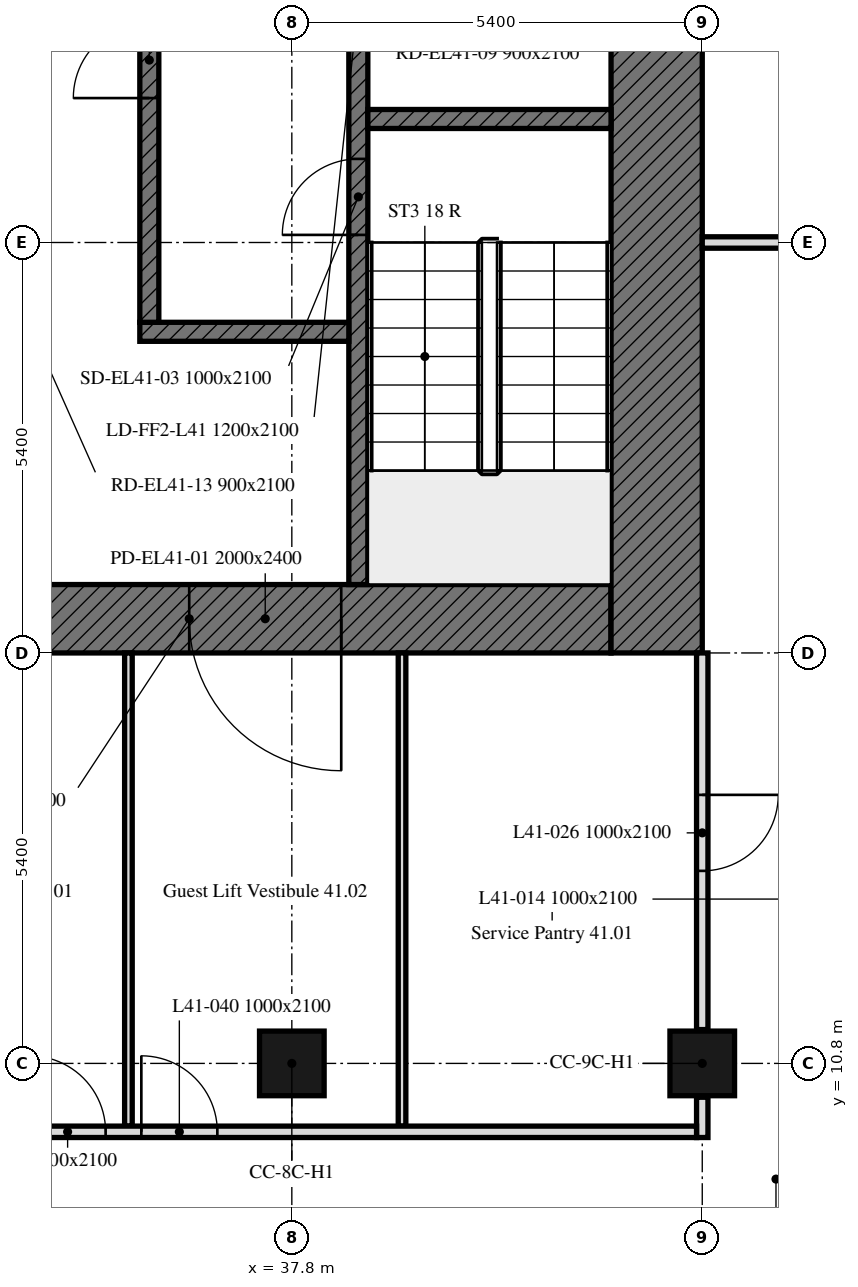
"""IFC4 building model, lengths in metres.
Left out: names, types, materials, properties, quantities, classifications, styles, units other than length and angle.
Written with IfcOpenShell. Run it as: python <this file> out.ifc"""

import sys

from ifc_helpers import new_model, si_unit, direction, frame, frame_2d, origin, origin_2d, place, context, subcontext, project, spatial, rectangle, extrude, element, fill, save


model = new_model("IFC4")
c1 = context("Model", 3, precision=1e-05, world=origin(), true_north=direction((0.0, 1.0)))
c2 = subcontext(c1, "Body", "Model", "MODEL_VIEW")
j1 = project(units=[si_unit("LENGTHUNIT", "METRE"), si_unit("PLANEANGLEUNIT", "RADIAN")], contexts=[c1])
p1 = place(None, origin())
s1 = spatial("IfcSite", under=j1, at=p1, CompositionType="ELEMENT")
p2 = place(p1, origin())
s2 = spatial("IfcBuilding", under=s1, at=p2, CompositionType="ELEMENT")
p3 = place(p2, frame((0.0, 0.0, 172.6)))
s3 = spatial("IfcBuildingStorey", under=s2, at=p3, CompositionType="ELEMENT", Elevation=172.6)
for number, where, z_axis, x_axis in (
    (1, (37.8, 10.8, 0.0), (0.0, 0.0, 1.0), (1.0, 0.0, 0.0)),
    (2, (43.2, 10.8, 0.0), (0.0, 0.0, 1.0), (1.0, 0.0, 0.0)),
):
    element("IfcColumn", number, at=place(p3, frame(where, z_axis=z_axis, x_axis=x_axis)), inside=s3, PredefinedType="COLUMN", context=c2, shape_type="SweptSolid", body=[
        extrude(rectangle(XDim=0.85, YDim=0.85, at=origin_2d()), origin(), (0.0, 0.0, 1.0), 2.8),
    ])
p4 = place(p3, frame((42.0, 16.65, 0.0), z_axis=(0.0, 0.0, 1.0), x_axis=(-1.0, 0.0, 0.0)))
e3 = element("IfcWall", 3, at=p4, inside=s3, PredefinedType="SOLIDWALL", context=c2, shape_type="SweptSolid", body=[
    extrude(rectangle(XDim=11.1, YDim=0.9, at=frame_2d((5.55, 0.0))), origin(), (0.0, 0.0, 1.0), 2.8),
])
p5 = place(p4, frame((3.55, 0.0, 0.0)))
e4 = element("IfcOpeningElement", 4, at=p5, cuts=e3, PredefinedType="OPENING", context=c2, shape_type="SweptSolid", body=[
    extrude(rectangle(XDim=2.0, YDim=2.4, at=frame_2d((1.0, 1.2))), frame((0.0, 0.45, 0.0), z_axis=(0.0, -1.0, 0.0), x_axis=(1.0, 0.0, 0.0)), (0.0, 0.0, 1.0), 0.9),
])
p6 = place(p3, frame((42.6, 32.4, 0.0), z_axis=(0.0, 0.0, 1.0), x_axis=(0.0, -1.0, 0.0)))
e5 = element("IfcWall", 5, at=p6, inside=s3, PredefinedType="SOLIDWALL", context=c2, shape_type="SweptSolid", body=[
    extrude(rectangle(XDim=16.2, YDim=1.2, at=frame_2d((8.1, 0.0))), origin(), (0.0, 0.0, 1.0), 2.8),
])
p7 = place(p3, frame((38.675, 17.1, 0.0), z_axis=(0.0, 0.0, 1.0), x_axis=(0.0, 1.0, 0.0)))
e6 = element("IfcWall", 6, at=p7, inside=s3, PredefinedType="SOLIDWALL", context=c2, shape_type="SweptSolid", body=[
    extrude(rectangle(XDim=14.4, YDim=0.25, at=frame_2d((7.2, 0.0))), origin(), (0.0, 0.0, 1.0), 2.8),
])
p8 = place(p7, frame((4.6, 0.0, 0.0)))
e7 = element("IfcOpeningElement", 7, at=p8, cuts=e6, PredefinedType="OPENING", context=c2, shape_type="SweptSolid", body=[
    extrude(rectangle(XDim=1.0, YDim=2.1, at=frame_2d((0.5, 1.05))), frame((0.0, 0.125, 0.0), z_axis=(0.0, -1.0, 0.0), x_axis=(1.0, 0.0, 0.0)), (0.0, 0.0, 1.0), 0.25),
])
p9 = place(p7, frame((7.062, 0.0, 0.0)))
e8 = element("IfcOpeningElement", 8, at=p9, cuts=e6, PredefinedType="OPENING", context=c2, shape_type="SweptSolid", body=[
    extrude(rectangle(XDim=1.2, YDim=2.1, at=frame_2d((0.6, 1.05))), frame((0.0, 0.125, 0.0), z_axis=(0.0, -1.0, 0.0), x_axis=(1.0, 0.0, 0.0)), (0.0, 0.0, 1.0), 0.25),
])
p10 = place(p7, frame((9.472, 0.0, 0.0)))
e9 = element("IfcOpeningElement", 9, at=p10, cuts=e6, PredefinedType="OPENING", context=c2, shape_type="SweptSolid", body=[
    extrude(rectangle(XDim=0.9, YDim=2.1, at=frame_2d((0.45, 1.05))), frame((0.0, 0.125, 0.0), z_axis=(0.0, -1.0, 0.0), x_axis=(1.0, 0.0, 0.0)), (0.0, 0.0, 1.0), 0.25),
])
p11 = place(p7, frame((10.779, 0.0, 0.0)))
e10 = element("IfcOpeningElement", 10, at=p11, cuts=e6, PredefinedType="OPENING", context=c2, shape_type="SweptSolid", body=[
    extrude(rectangle(XDim=0.9, YDim=2.1, at=frame_2d((0.45, 1.05))), frame((0.0, 0.125, 0.0), z_axis=(0.0, -1.0, 0.0), x_axis=(1.0, 0.0, 0.0)), (0.0, 0.0, 1.0), 0.25),
])
p12 = place(p7, frame((12.048, 0.0, 0.0)))
e11 = element("IfcOpeningElement", 11, at=p12, cuts=e6, PredefinedType="OPENING", context=c2, shape_type="SweptSolid", body=[
    extrude(rectangle(XDim=0.9, YDim=2.1, at=frame_2d((0.45, 1.05))), frame((0.0, 0.125, 0.0), z_axis=(0.0, -1.0, 0.0), x_axis=(1.0, 0.0, 0.0)), (0.0, 0.0, 1.0), 0.25),
])
p13 = place(p7, frame((13.354, 0.0, 0.0)))
e12 = element("IfcOpeningElement", 12, at=p13, cuts=e6, PredefinedType="OPENING", context=c2, shape_type="SweptSolid", body=[
    extrude(rectangle(XDim=0.9, YDim=2.1, at=frame_2d((0.45, 1.05))), frame((0.0, 0.125, 0.0), z_axis=(0.0, -1.0, 0.0), x_axis=(1.0, 0.0, 0.0)), (0.0, 0.0, 1.0), 0.25),
])
p14 = place(p3, frame((38.8, 23.225, 0.0), z_axis=(0.0, 0.0, 1.0), x_axis=(1.0, 0.0, 0.0)))
e13 = element("IfcWall", 13, at=p14, inside=s3, PredefinedType="SOLIDWALL", context=c2, shape_type="SweptSolid", body=[
    extrude(rectangle(XDim=3.2, YDim=0.25, at=frame_2d((1.6, 0.0))), origin(), (0.0, 0.0, 1.0), 2.8),
])
p15 = place(p3, frame((35.8, 20.425, 0.0), z_axis=(0.0, 0.0, 1.0), x_axis=(1.0, 0.0, 0.0)))
e14 = element("IfcWall", 14, at=p15, inside=s3, PredefinedType="SOLIDWALL", context=c2, shape_type="SweptSolid", body=[
    extrude(rectangle(XDim=2.75, YDim=0.25, at=frame_2d((1.375, 0.0))), origin(), (0.0, 0.0, 1.0), 2.8),
])
p16 = place(p3, frame((35.925, 20.55, 0.0), z_axis=(0.0, 0.0, 1.0), x_axis=(0.0, 1.0, 0.0)))
e15 = element("IfcWall", 15, at=p16, inside=s3, PredefinedType="SOLIDWALL", context=c2, shape_type="SweptSolid", body=[
    extrude(rectangle(XDim=5.625, YDim=0.25, at=frame_2d((2.812, 0.0))), origin(), (0.0, 0.0, 1.0), 2.8),
])
p17 = place(p16, frame((2.95, 0.0, 0.0)))
e16 = element("IfcOpeningElement", 16, at=p17, cuts=e15, PredefinedType="OPENING", context=c2, shape_type="SweptSolid", body=[
    extrude(rectangle(XDim=1.0, YDim=2.1, at=frame_2d((0.5, 1.05))), frame((0.0, 0.125, 0.0), z_axis=(0.0, -1.0, 0.0), x_axis=(1.0, 0.0, 0.0)), (0.0, 0.0, 1.0), 0.25),
])
p18 = place(p3, frame((43.2, 21.6, 0.0), z_axis=(0.0, 0.0, 1.0), x_axis=(1.0, 0.0, 0.0)))
e17 = element("IfcWall", 17, at=p18, inside=s3, PredefinedType="PARTITIONING", context=c2, shape_type="SweptSolid", body=[
    extrude(rectangle(XDim=4.649, YDim=0.15, at=frame_2d((2.325, 0.0))), origin(), (0.0, 0.0, 1.0), 2.2),
])
for number, where, z_axis, x_axis in (
    (18, (35.65, 16.2, 0.0), (0.0, 0.0, 1.0), (0.0, -1.0, 0.0)),
    (19, (39.25, 9.975, 0.0), (0.0, 0.0, 1.0), (0.0, 1.0, 0.0)),
):
    element("IfcWall", number, at=place(p3, frame(where, z_axis=z_axis, x_axis=x_axis)), inside=s3, PredefinedType="PARTITIONING", context=c2, shape_type="SweptSolid", body=[
        extrude(rectangle(XDim=6.225, YDim=0.1, at=frame_2d((3.112, 0.0))), origin(), (0.0, 0.0, 1.0), 2.2),
    ])
p19 = place(p3, frame((43.2, 16.2, 0.0), z_axis=(0.0, 0.0, 1.0), x_axis=(0.0, -1.0, 0.0)))
e20 = element("IfcWall", 20, at=p19, inside=s3, PredefinedType="PARTITIONING", context=c2, shape_type="SweptSolid", body=[
    extrude(rectangle(XDim=4.955, YDim=0.15, at=frame_2d((2.478, 0.0))), origin(), (0.0, 0.0, 1.0), 2.8),
])
p20 = place(p19, frame((1.867, 0.0, 0.0)))
e21 = element("IfcOpeningElement", 21, at=p20, cuts=e20, PredefinedType="OPENING", context=c2, shape_type="SweptSolid", body=[
    extrude(rectangle(XDim=1.0, YDim=2.1, at=frame_2d((0.5, 1.05))), frame((0.0, 0.075, 0.0), z_axis=(0.0, -1.0, 0.0), x_axis=(1.0, 0.0, 0.0)), (0.0, 0.0, 1.0), 0.15),
])
p21 = place(p3, frame((43.2, 10.355, 0.0), z_axis=(0.0, 0.0, 1.0), x_axis=(0.0, -1.0, 0.0)))
e22 = element("IfcWall", 22, at=p21, inside=s3, PredefinedType="PARTITIONING", context=c2, shape_type="SweptSolid", body=[
    extrude(rectangle(XDim=0.53, YDim=0.15, at=frame_2d((0.265, 0.0))), origin(), (0.0, 0.0, 1.0), 2.8),
])
p22 = place(p3, frame((6.151, 9.9, 0.0), z_axis=(0.0, 0.0, 1.0), x_axis=(1.0, 0.0, 0.0)))
e23 = element("IfcWall", 23, at=p22, inside=s3, PredefinedType="PARTITIONING", context=c2, shape_type="SweptSolid", body=[
    extrude(rectangle(XDim=36.974, YDim=0.15, at=frame_2d((18.487, 0.0))), origin(), (0.0, 0.0, 1.0), 2.2),
])
p23 = place(p22, frame((17.649, 0.0, 0.0)))
e24 = element("IfcOpeningElement", 24, at=p23, cuts=e23, PredefinedType="OPENING", context=c2, shape_type="SweptSolid", body=[
    extrude(rectangle(XDim=1.0, YDim=2.1, at=frame_2d((0.5, 1.05))), frame((0.0, 0.075, 0.0), z_axis=(0.0, -1.0, 0.0), x_axis=(1.0, 0.0, 0.0)), (0.0, 0.0, 1.0), 0.15),
])
p24 = place(p22, frame((1.409, 0.0, 0.0)))
e25 = element("IfcOpeningElement", 25, at=p24, cuts=e23, PredefinedType="OPENING", context=c2, shape_type="SweptSolid", body=[
    extrude(rectangle(XDim=1.0, YDim=2.1, at=frame_2d((0.5, 1.05))), frame((0.0, 0.075, 0.0), z_axis=(0.0, -1.0, 0.0), x_axis=(1.0, 0.0, 0.0)), (0.0, 0.0, 1.0), 0.15),
])
p25 = place(p22, frame((28.199, 0.0, 0.0)))
e26 = element("IfcOpeningElement", 26, at=p25, cuts=e23, PredefinedType="OPENING", context=c2, shape_type="SweptSolid", body=[
    extrude(rectangle(XDim=1.0, YDim=2.1, at=frame_2d((0.5, 1.05))), frame((0.0, 0.075, 0.0), z_axis=(0.0, -1.0, 0.0), x_axis=(1.0, 0.0, 0.0)), (0.0, 0.0, 1.0), 0.15),
])
p26 = place(p22, frame((7.099, 0.0, 0.0)))
e27 = element("IfcOpeningElement", 27, at=p26, cuts=e23, PredefinedType="OPENING", context=c2, shape_type="SweptSolid", body=[
    extrude(rectangle(XDim=1.0, YDim=2.1, at=frame_2d((0.5, 1.05))), frame((0.0, 0.075, 0.0), z_axis=(0.0, -1.0, 0.0), x_axis=(1.0, 0.0, 0.0)), (0.0, 0.0, 1.0), 0.15),
])
p27 = place(p22, frame((5.629, 0.0, 0.0)))
e28 = element("IfcOpeningElement", 28, at=p27, cuts=e23, PredefinedType="OPENING", context=c2, shape_type="SweptSolid", body=[
    extrude(rectangle(XDim=1.0, YDim=2.1, at=frame_2d((0.5, 1.05))), frame((0.0, 0.075, 0.0), z_axis=(0.0, -1.0, 0.0), x_axis=(1.0, 0.0, 0.0)), (0.0, 0.0, 1.0), 0.15),
])
p28 = place(p22, frame((29.669, 0.0, 0.0)))
e29 = element("IfcOpeningElement", 29, at=p28, cuts=e23, PredefinedType="OPENING", context=c2, shape_type="SweptSolid", body=[
    extrude(rectangle(XDim=1.0, YDim=2.1, at=frame_2d((0.5, 1.05))), frame((0.0, 0.075, 0.0), z_axis=(0.0, -1.0, 0.0), x_axis=(1.0, 0.0, 0.0)), (0.0, 0.0, 1.0), 0.15),
])
p29 = place(p5, origin())
e30 = element("IfcDoor", 30, at=p29, inside=s3, OperationType="DOUBLE_DOOR_SINGLE_SWING", PredefinedType="DOOR", context=c2, shape_type="SweptSolid", body=[
    extrude(rectangle(XDim=2.0, YDim=2.4, at=frame_2d((1.0, 1.2))), frame((0.0, 0.025, 0.0), z_axis=(0.0, -1.0, 0.0), x_axis=(1.0, 0.0, 0.0)), (0.0, 0.0, 1.0), 0.05),
])
fill(e4, e30)
p30 = place(p8, origin())
e31 = element("IfcDoor", 31, at=p30, inside=s3, OperationType="SINGLE_SWING_LEFT", PredefinedType="DOOR", context=c2, shape_type="SweptSolid", body=[
    extrude(rectangle(XDim=1.0, YDim=2.1, at=frame_2d((0.5, 1.05))), frame((0.0, 0.025, 0.0), z_axis=(0.0, -1.0, 0.0), x_axis=(1.0, 0.0, 0.0)), (0.0, 0.0, 1.0), 0.05),
])
fill(e7, e31)
p31 = place(p17, origin())
e32 = element("IfcDoor", 32, at=p31, inside=s3, OperationType="SINGLE_SWING_LEFT", PredefinedType="DOOR", context=c2, shape_type="SweptSolid", body=[
    extrude(rectangle(XDim=1.0, YDim=2.1, at=frame_2d((0.5, 1.05))), frame((0.0, 0.025, 0.0), z_axis=(0.0, -1.0, 0.0), x_axis=(1.0, 0.0, 0.0)), (0.0, 0.0, 1.0), 0.05),
])
fill(e16, e32)
p32 = place(p25, origin())
e33 = element("IfcDoor", 33, at=p32, inside=s3, OperationType="SINGLE_SWING_LEFT", PredefinedType="DOOR", context=c2, shape_type="SweptSolid", body=[
    extrude(rectangle(XDim=1.0, YDim=2.1, at=frame_2d((0.5, 1.05))), frame((0.0, 0.025, 0.0), z_axis=(0.0, -1.0, 0.0), x_axis=(1.0, 0.0, 0.0)), (0.0, 0.0, 1.0), 0.05),
])
fill(e26, e33)
p33 = place(p20, origin())
e34 = element("IfcDoor", 34, at=p33, inside=s3, OperationType="SINGLE_SWING_RIGHT", PredefinedType="DOOR", context=c2, shape_type="SweptSolid", body=[
    extrude(rectangle(XDim=1.0, YDim=2.1, at=frame_2d((0.5, 1.05))), frame((0.0, 0.025, 0.0), z_axis=(0.0, -1.0, 0.0), x_axis=(1.0, 0.0, 0.0)), (0.0, 0.0, 1.0), 0.05),
])
fill(e21, e34)
p34 = place(p28, origin())
e35 = element("IfcDoor", 35, at=p34, inside=s3, OperationType="SINGLE_SWING_LEFT", PredefinedType="DOOR", context=c2, shape_type="SweptSolid", body=[
    extrude(rectangle(XDim=1.0, YDim=2.1, at=frame_2d((0.5, 1.05))), frame((0.0, 0.025, 0.0), z_axis=(0.0, -1.0, 0.0), x_axis=(1.0, 0.0, 0.0)), (0.0, 0.0, 1.0), 0.05),
])
fill(e29, e35)
save(model, sys.argv[1])
